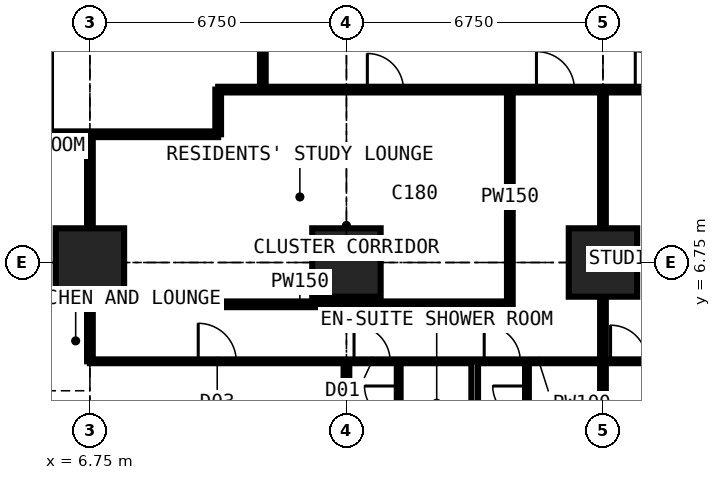
"""IFC4 building model, lengths in metres.
Left out: names, types, materials, properties, quantities, classifications, styles, units other than length and angle.
Written with IfcOpenShell. Run it as: python <this file> out.ifc"""

import sys

from ifc_helpers import new_model, si_unit, direction, frame, frame_2d, origin, origin_2d, place, context, subcontext, project, spatial, rectangle, extrude, element, fill, save


model = new_model("IFC4")
c1 = context("Model", 3, precision=1e-05, world=origin(), true_north=direction((0.0, 1.0)))
c2 = subcontext(c1, "Body", "Model", "MODEL_VIEW")
j1 = project(units=[si_unit("LENGTHUNIT", "METRE"), si_unit("PLANEANGLEUNIT", "RADIAN")], contexts=[c1])
p1 = place(None, origin())
s1 = spatial("IfcSite", under=j1, at=p1, CompositionType="ELEMENT")
p2 = place(p1, origin())
s2 = spatial("IfcBuilding", under=s1, at=p2, CompositionType="ELEMENT")
p3 = place(p2, frame((0.0, 0.0, 57.6)))
s3 = spatial("IfcBuildingStorey", under=s2, at=p3, CompositionType="ELEMENT", Elevation=57.6)
for number, where, z_axis, x_axis in (
    (1, (6.75, 6.75, 0.0), (0.0, 0.0, 1.0), (1.0, 0.0, 0.0)),
    (2, (13.5, 6.75, 0.0), (0.0, 0.0, 1.0), (1.0, 0.0, 0.0)),
    (3, (20.25, 6.75, 0.0), (0.0, 0.0, 1.0), (1.0, 0.0, 0.0)),
):
    element("IfcColumn", number, at=place(p3, frame(where, z_axis=z_axis, x_axis=x_axis)), inside=s3, PredefinedType="COLUMN", context=c2, shape_type="SweptSolid", body=[
        extrude(rectangle(XDim=1.8, YDim=1.8, at=origin_2d()), origin(), (0.0, 0.0, 1.0), 3.6),
    ])
p4 = place(p3, frame((-0.734, 10.125, 0.0), z_axis=(0.0, 0.0, 1.0), x_axis=(1.0, 0.0, 0.0)))
e4 = element("IfcWall", 4, at=p4, inside=s3, PredefinedType="PARTITIONING", context=c2, shape_type="SweptSolid", body=[
    extrude(rectangle(XDim=10.859, YDim=0.15, at=frame_2d((5.429, 0.0))), origin(), (0.0, 0.0, 1.0), 3.375),
])
p5 = place(p3, frame((6.75, 4.15, 0.0), z_axis=(0.0, 0.0, 1.0), x_axis=(0.0, 1.0, 0.0)))
e5 = element("IfcWall", 5, at=p5, inside=s3, PredefinedType="PARTITIONING", context=c2, shape_type="SweptSolid", body=[
    extrude(rectangle(XDim=5.975, YDim=0.15, at=frame_2d((2.988, 0.0))), origin(), (0.0, 0.0, 1.0), 2.877),
])
p6 = place(p3, frame((6.75, 4.15, 0.0), z_axis=(0.0, 0.0, 1.0), x_axis=(1.0, 0.0, 0.0)))
e6 = element("IfcWall", 6, at=p6, inside=s3, PredefinedType="PARTITIONING", context=c2, shape_type="SweptSolid", body=[
    extrude(rectangle(XDim=23.625, YDim=0.1, at=frame_2d((11.812, 0.0))), origin(), (0.0, 0.0, 1.0), 3.375),
])
p7 = place(p6, frame((2.85, 0.0, 0.0)))
e7 = element("IfcOpeningElement", 7, at=p7, cuts=e6, PredefinedType="OPENING", context=c2, shape_type="SweptSolid", body=[
    extrude(rectangle(XDim=1.0, YDim=2.2, at=frame_2d((0.5, 1.1))), frame((0.0, 0.06, 0.0), z_axis=(0.0, -1.0, 0.0), x_axis=(1.0, 0.0, 0.0)), (0.0, 0.0, 1.0), 0.12),
])
p8 = place(p6, frame((6.95, 0.0, 0.0)))
e8 = element("IfcOpeningElement", 8, at=p8, cuts=e6, PredefinedType="OPENING", context=c2, shape_type="SweptSolid", body=[
    extrude(rectangle(XDim=0.95, YDim=2.2, at=frame_2d((0.475, 1.1))), frame((0.0, 0.06, 0.0), z_axis=(0.0, -1.0, 0.0), x_axis=(1.0, 0.0, 0.0)), (0.0, 0.0, 1.0), 0.12),
])
p9 = place(p6, frame((10.375, 0.0, 0.0)))
e9 = element("IfcOpeningElement", 9, at=p9, cuts=e6, PredefinedType="OPENING", context=c2, shape_type="SweptSolid", body=[
    extrude(rectangle(XDim=0.95, YDim=2.2, at=frame_2d((0.475, 1.1))), frame((0.0, 0.06, 0.0), z_axis=(0.0, -1.0, 0.0), x_axis=(1.0, 0.0, 0.0)), (0.0, 0.0, 1.0), 0.12),
])
p10 = place(p6, frame((18.475, 0.0, 0.0)))
e10 = element("IfcOpeningElement", 10, at=p10, cuts=e6, PredefinedType="OPENING", context=c2, shape_type="SweptSolid", body=[
    extrude(rectangle(XDim=0.95, YDim=2.2, at=frame_2d((0.475, 1.1))), frame((0.0, 0.06, 0.0), z_axis=(0.0, -1.0, 0.0), x_axis=(1.0, 0.0, 0.0)), (0.0, 0.0, 1.0), 0.12),
])
p11 = place(p6, frame((13.7, 0.0, 0.0)))
e11 = element("IfcOpeningElement", 11, at=p11, cuts=e6, PredefinedType="OPENING", context=c2, shape_type="SweptSolid", body=[
    extrude(rectangle(XDim=0.95, YDim=2.2, at=frame_2d((0.475, 1.1))), frame((0.0, 0.06, 0.0), z_axis=(0.0, -1.0, 0.0), x_axis=(1.0, 0.0, 0.0)), (0.0, 0.0, 1.0), 0.12),
])
p12 = place(p3, frame((6.75, 5.65, 0.0), z_axis=(0.0, 0.0, 1.0), x_axis=(1.0, 0.0, 0.0)))
e12 = element("IfcWall", 12, at=p12, inside=s3, PredefinedType="PARTITIONING", context=c2, shape_type="SweptSolid", body=[
    extrude(rectangle(XDim=11.05, YDim=0.15, at=frame_2d((5.525, 0.0))), origin(), (0.0, 0.0, 1.0), 3.375),
])
p13 = place(p3, frame((10.125, 10.125, 0.0), z_axis=(0.0, 0.0, 1.0), x_axis=(0.0, 1.0, 0.0)))
e13 = element("IfcWall", 13, at=p13, inside=s3, PredefinedType="PARTITIONING", context=c2, shape_type="SweptSolid", body=[
    extrude(rectangle(XDim=1.175, YDim=0.15, at=frame_2d((0.587, 0.0))), origin(), (0.0, 0.0, 1.0), 3.375),
])
p14 = place(p3, frame((10.125, 11.3, 0.0), z_axis=(0.0, 0.0, 1.0), x_axis=(1.0, 0.0, 0.0)))
e14 = element("IfcWall", 14, at=p14, inside=s3, PredefinedType="PARTITIONING", context=c2, shape_type="SweptSolid", body=[
    extrude(rectangle(XDim=20.675, YDim=0.15, at=frame_2d((10.337, 0.0))), origin(), (0.0, 0.0, 1.0), 3.375),
])
p15 = place(p14, frame((8.375, 0.0, 0.0)))
e15 = element("IfcOpeningElement", 15, at=p15, cuts=e14, PredefinedType="OPENING", context=c2, shape_type="SweptSolid", body=[
    extrude(rectangle(XDim=1.0, YDim=2.2, at=frame_2d((0.5, 1.1))), frame((0.0, 0.085, 0.0), z_axis=(0.0, -1.0, 0.0), x_axis=(1.0, 0.0, 0.0)), (0.0, 0.0, 1.0), 0.17),
])
p16 = place(p14, frame((10.975, 0.0, 0.0)))
e16 = element("IfcOpeningElement", 16, at=p16, cuts=e14, PredefinedType="OPENING", context=c2, shape_type="SweptSolid", body=[
    extrude(rectangle(XDim=1.0, YDim=2.2, at=frame_2d((0.5, 1.1))), frame((0.0, 0.085, 0.0), z_axis=(0.0, -1.0, 0.0), x_axis=(1.0, 0.0, 0.0)), (0.0, 0.0, 1.0), 0.17),
])
p17 = place(p14, frame((3.925, 0.0, 0.0)))
e17 = element("IfcOpeningElement", 17, at=p17, cuts=e14, PredefinedType="OPENING", context=c2, shape_type="SweptSolid", body=[
    extrude(rectangle(XDim=0.95, YDim=2.2, at=frame_2d((0.475, 1.1))), frame((0.0, 0.085, 0.0), z_axis=(0.0, -1.0, 0.0), x_axis=(1.0, 0.0, 0.0)), (0.0, 0.0, 1.0), 0.17),
])
p18 = place(p3, frame((11.3, 11.3, 0.0), z_axis=(0.0, 0.0, 1.0), x_axis=(0.0, 1.0, 0.0)))
e18 = element("IfcWall", 18, at=p18, inside=s3, PredefinedType="PARTITIONING", context=c2, shape_type="SweptSolid", body=[
    extrude(rectangle(XDim=19.075, YDim=0.15, at=frame_2d((9.538, 0.0))), origin(), (0.0, 0.0, 1.0), 3.375),
])
p19 = place(p18, frame((12.875, 0.0, 0.0)))
e19 = element("IfcOpeningElement", 19, at=p19, cuts=e18, PredefinedType="OPENING", context=c2, shape_type="SweptSolid", body=[
    extrude(rectangle(XDim=1.0, YDim=2.2, at=frame_2d((0.5, 1.1))), frame((0.0, 0.085, 0.0), z_axis=(0.0, -1.0, 0.0), x_axis=(1.0, 0.0, 0.0)), (0.0, 0.0, 1.0), 0.17),
])
p20 = place(p18, frame((10.438, 0.0, 0.0)))
e20 = element("IfcOpeningElement", 20, at=p20, cuts=e18, PredefinedType="OPENING", context=c2, shape_type="SweptSolid", body=[
    extrude(rectangle(XDim=1.0, YDim=2.2, at=frame_2d((0.5, 1.1))), frame((0.0, 0.085, 0.0), z_axis=(0.0, -1.0, 0.0), x_axis=(1.0, 0.0, 0.0)), (0.0, 0.0, 1.0), 0.17),
])
p21 = place(p18, frame((15.675, 0.0, 0.0)))
e21 = element("IfcOpeningElement", 21, at=p21, cuts=e18, PredefinedType="OPENING", context=c2, shape_type="SweptSolid", body=[
    extrude(rectangle(XDim=0.95, YDim=2.2, at=frame_2d((0.475, 1.1))), frame((0.0, 0.085, 0.0), z_axis=(0.0, -1.0, 0.0), x_axis=(1.0, 0.0, 0.0)), (0.0, 0.0, 1.0), 0.17),
])
p22 = place(p3, frame((13.5, -0.734, 0.0), z_axis=(0.0, 0.0, 1.0), x_axis=(0.0, 1.0, 0.0)))
e22 = element("IfcWall", 22, at=p22, inside=s3, PredefinedType="PARTITIONING", context=c2, shape_type="SweptSolid", body=[
    extrude(rectangle(XDim=4.884, YDim=0.15, at=frame_2d((2.442, 0.0))), origin(), (0.0, 0.0, 1.0), 2.61),
])
p23 = place(p3, frame((14.875, 1.95, 0.0), z_axis=(0.0, 0.0, 1.0), x_axis=(0.0, 1.0, 0.0)))
e23 = element("IfcWall", 23, at=p23, inside=s3, PredefinedType="PARTITIONING", context=c2, shape_type="SweptSolid", body=[
    extrude(rectangle(XDim=2.2, YDim=0.1, at=frame_2d((1.1, 0.0))), origin(), (0.0, 0.0, 1.0), 3.375),
])
p24 = place(p23, frame((0.65, 0.0, 0.0)))
e24 = element("IfcOpeningElement", 24, at=p24, cuts=e23, PredefinedType="OPENING", context=c2, shape_type="SweptSolid", body=[
    extrude(rectangle(XDim=0.9, YDim=2.2, at=frame_2d((0.45, 1.1))), frame((0.0, 0.06, 0.0), z_axis=(0.0, -1.0, 0.0), x_axis=(1.0, 0.0, 0.0)), (0.0, 0.0, 1.0), 0.12),
])
p25 = place(p3, frame((16.875, -0.734, 0.0), z_axis=(0.0, 0.0, 1.0), x_axis=(0.0, 1.0, 0.0)))
e25 = element("IfcWall", 25, at=p25, inside=s3, PredefinedType="PARTITIONING", context=c2, shape_type="SweptSolid", body=[
    extrude(rectangle(XDim=4.884, YDim=0.175, at=frame_2d((2.442, 0.0))), origin(), (0.0, 0.0, 1.0), 3.375),
])
p26 = place(p3, frame((17.8, 5.65, 0.0), z_axis=(0.0, 0.0, 1.0), x_axis=(0.0, 1.0, 0.0)))
e26 = element("IfcWall", 26, at=p26, inside=s3, PredefinedType="PARTITIONING", context=c2, shape_type="SweptSolid", body=[
    extrude(rectangle(XDim=5.65, YDim=0.15, at=frame_2d((2.825, 0.0))), origin(), (0.0, 0.0, 1.0), 3.375),
])
p27 = place(p3, frame((18.25, 1.95, 0.0), z_axis=(0.0, 0.0, 1.0), x_axis=(0.0, 1.0, 0.0)))
e27 = element("IfcWall", 27, at=p27, inside=s3, PredefinedType="PARTITIONING", context=c2, shape_type="SweptSolid", body=[
    extrude(rectangle(XDim=2.2, YDim=0.1, at=frame_2d((1.1, 0.0))), origin(), (0.0, 0.0, 1.0), 3.375),
])
p28 = place(p27, frame((0.65, 0.0, 0.0)))
e28 = element("IfcOpeningElement", 28, at=p28, cuts=e27, PredefinedType="OPENING", context=c2, shape_type="SweptSolid", body=[
    extrude(rectangle(XDim=0.9, YDim=2.2, at=frame_2d((0.45, 1.1))), frame((0.0, 0.06, 0.0), z_axis=(0.0, -1.0, 0.0), x_axis=(1.0, 0.0, 0.0)), (0.0, 0.0, 1.0), 0.12),
])
p29 = place(p3, frame((20.25, -0.734, 0.0), z_axis=(0.0, 0.0, 1.0), x_axis=(0.0, 1.0, 0.0)))
e29 = element("IfcWall", 29, at=p29, inside=s3, PredefinedType="PARTITIONING", context=c2, shape_type="SweptSolid", body=[
    extrude(rectangle(XDim=12.034, YDim=0.15, at=frame_2d((6.017, 0.0))), origin(), (0.0, 0.0, 1.0), 2.61),
])
p30 = place(p7, origin())
e30 = element("IfcDoor", 30, at=p30, inside=s3, OperationType="SINGLE_SWING_LEFT", PredefinedType="DOOR", context=c2, shape_type="SweptSolid", body=[
    extrude(rectangle(XDim=1.0, YDim=2.2, at=frame_2d((0.5, 1.1))), frame((0.0, 0.025, 0.0), z_axis=(0.0, -1.0, 0.0), x_axis=(1.0, 0.0, 0.0)), (0.0, 0.0, 1.0), 0.05),
])
fill(e7, e30)
p31 = place(p8, origin())
e31 = element("IfcDoor", 31, at=p31, inside=s3, OperationType="SINGLE_SWING_LEFT", PredefinedType="DOOR", context=c2, shape_type="SweptSolid", body=[
    extrude(rectangle(XDim=0.95, YDim=2.2, at=frame_2d((0.475, 1.1))), frame((0.0, 0.025, 0.0), z_axis=(0.0, -1.0, 0.0), x_axis=(1.0, 0.0, 0.0)), (0.0, 0.0, 1.0), 0.05),
])
fill(e8, e31)
p32 = place(p24, origin())
e32 = element("IfcDoor", 32, at=p32, inside=s3, OperationType="SINGLE_SWING_RIGHT", PredefinedType="DOOR", context=c2, shape_type="SweptSolid", body=[
    extrude(rectangle(XDim=0.9, YDim=2.2, at=frame_2d((0.45, 1.1))), frame((0.0, 0.025, 0.0), z_axis=(0.0, -1.0, 0.0), x_axis=(1.0, 0.0, 0.0)), (0.0, 0.0, 1.0), 0.05),
])
fill(e24, e32)
p33 = place(p9, origin())
e33 = element("IfcDoor", 33, at=p33, inside=s3, OperationType="SINGLE_SWING_LEFT", PredefinedType="DOOR", context=c2, shape_type="SweptSolid", body=[
    extrude(rectangle(XDim=0.95, YDim=2.2, at=frame_2d((0.475, 1.1))), frame((0.0, 0.025, 0.0), z_axis=(0.0, -1.0, 0.0), x_axis=(1.0, 0.0, 0.0)), (0.0, 0.0, 1.0), 0.05),
])
fill(e9, e33)
p34 = place(p28, origin())
e34 = element("IfcDoor", 34, at=p34, inside=s3, OperationType="SINGLE_SWING_RIGHT", PredefinedType="DOOR", context=c2, shape_type="SweptSolid", body=[
    extrude(rectangle(XDim=0.9, YDim=2.2, at=frame_2d((0.45, 1.1))), frame((0.0, 0.025, 0.0), z_axis=(0.0, -1.0, 0.0), x_axis=(1.0, 0.0, 0.0)), (0.0, 0.0, 1.0), 0.05),
])
fill(e28, e34)
p35 = place(p15, origin())
e35 = element("IfcDoor", 35, at=p35, inside=s3, OperationType="SINGLE_SWING_LEFT", PredefinedType="DOOR", context=c2, shape_type="SweptSolid", body=[
    extrude(rectangle(XDim=1.0, YDim=2.2, at=frame_2d((0.5, 1.1))), frame((0.0, 0.025, 0.0), z_axis=(0.0, -1.0, 0.0), x_axis=(1.0, 0.0, 0.0)), (0.0, 0.0, 1.0), 0.05),
])
fill(e15, e35)
p36 = place(p11, origin())
e36 = element("IfcDoor", 36, at=p36, inside=s3, OperationType="SINGLE_SWING_LEFT", PredefinedType="DOOR", context=c2, shape_type="SweptSolid", body=[
    extrude(rectangle(XDim=0.95, YDim=2.2, at=frame_2d((0.475, 1.1))), frame((0.0, 0.025, 0.0), z_axis=(0.0, -1.0, 0.0), x_axis=(1.0, 0.0, 0.0)), (0.0, 0.0, 1.0), 0.05),
])
fill(e11, e36)
p37 = place(p16, origin())
e37 = element("IfcDoor", 37, at=p37, inside=s3, OperationType="SINGLE_SWING_LEFT", PredefinedType="DOOR", context=c2, shape_type="SweptSolid", body=[
    extrude(rectangle(XDim=1.0, YDim=2.2, at=frame_2d((0.5, 1.1))), frame((0.0, 0.025, 0.0), z_axis=(0.0, -1.0, 0.0), x_axis=(1.0, 0.0, 0.0)), (0.0, 0.0, 1.0), 0.05),
])
fill(e16, e37)
p38 = place(p17, origin())
e38 = element("IfcDoor", 38, at=p38, inside=s3, OperationType="SINGLE_SWING_LEFT", PredefinedType="DOOR", context=c2, shape_type="SweptSolid", body=[
    extrude(rectangle(XDim=0.95, YDim=2.2, at=frame_2d((0.475, 1.1))), frame((0.0, 0.025, 0.0), z_axis=(0.0, -1.0, 0.0), x_axis=(1.0, 0.0, 0.0)), (0.0, 0.0, 1.0), 0.05),
])
fill(e17, e38)
save(model, sys.argv[1])
